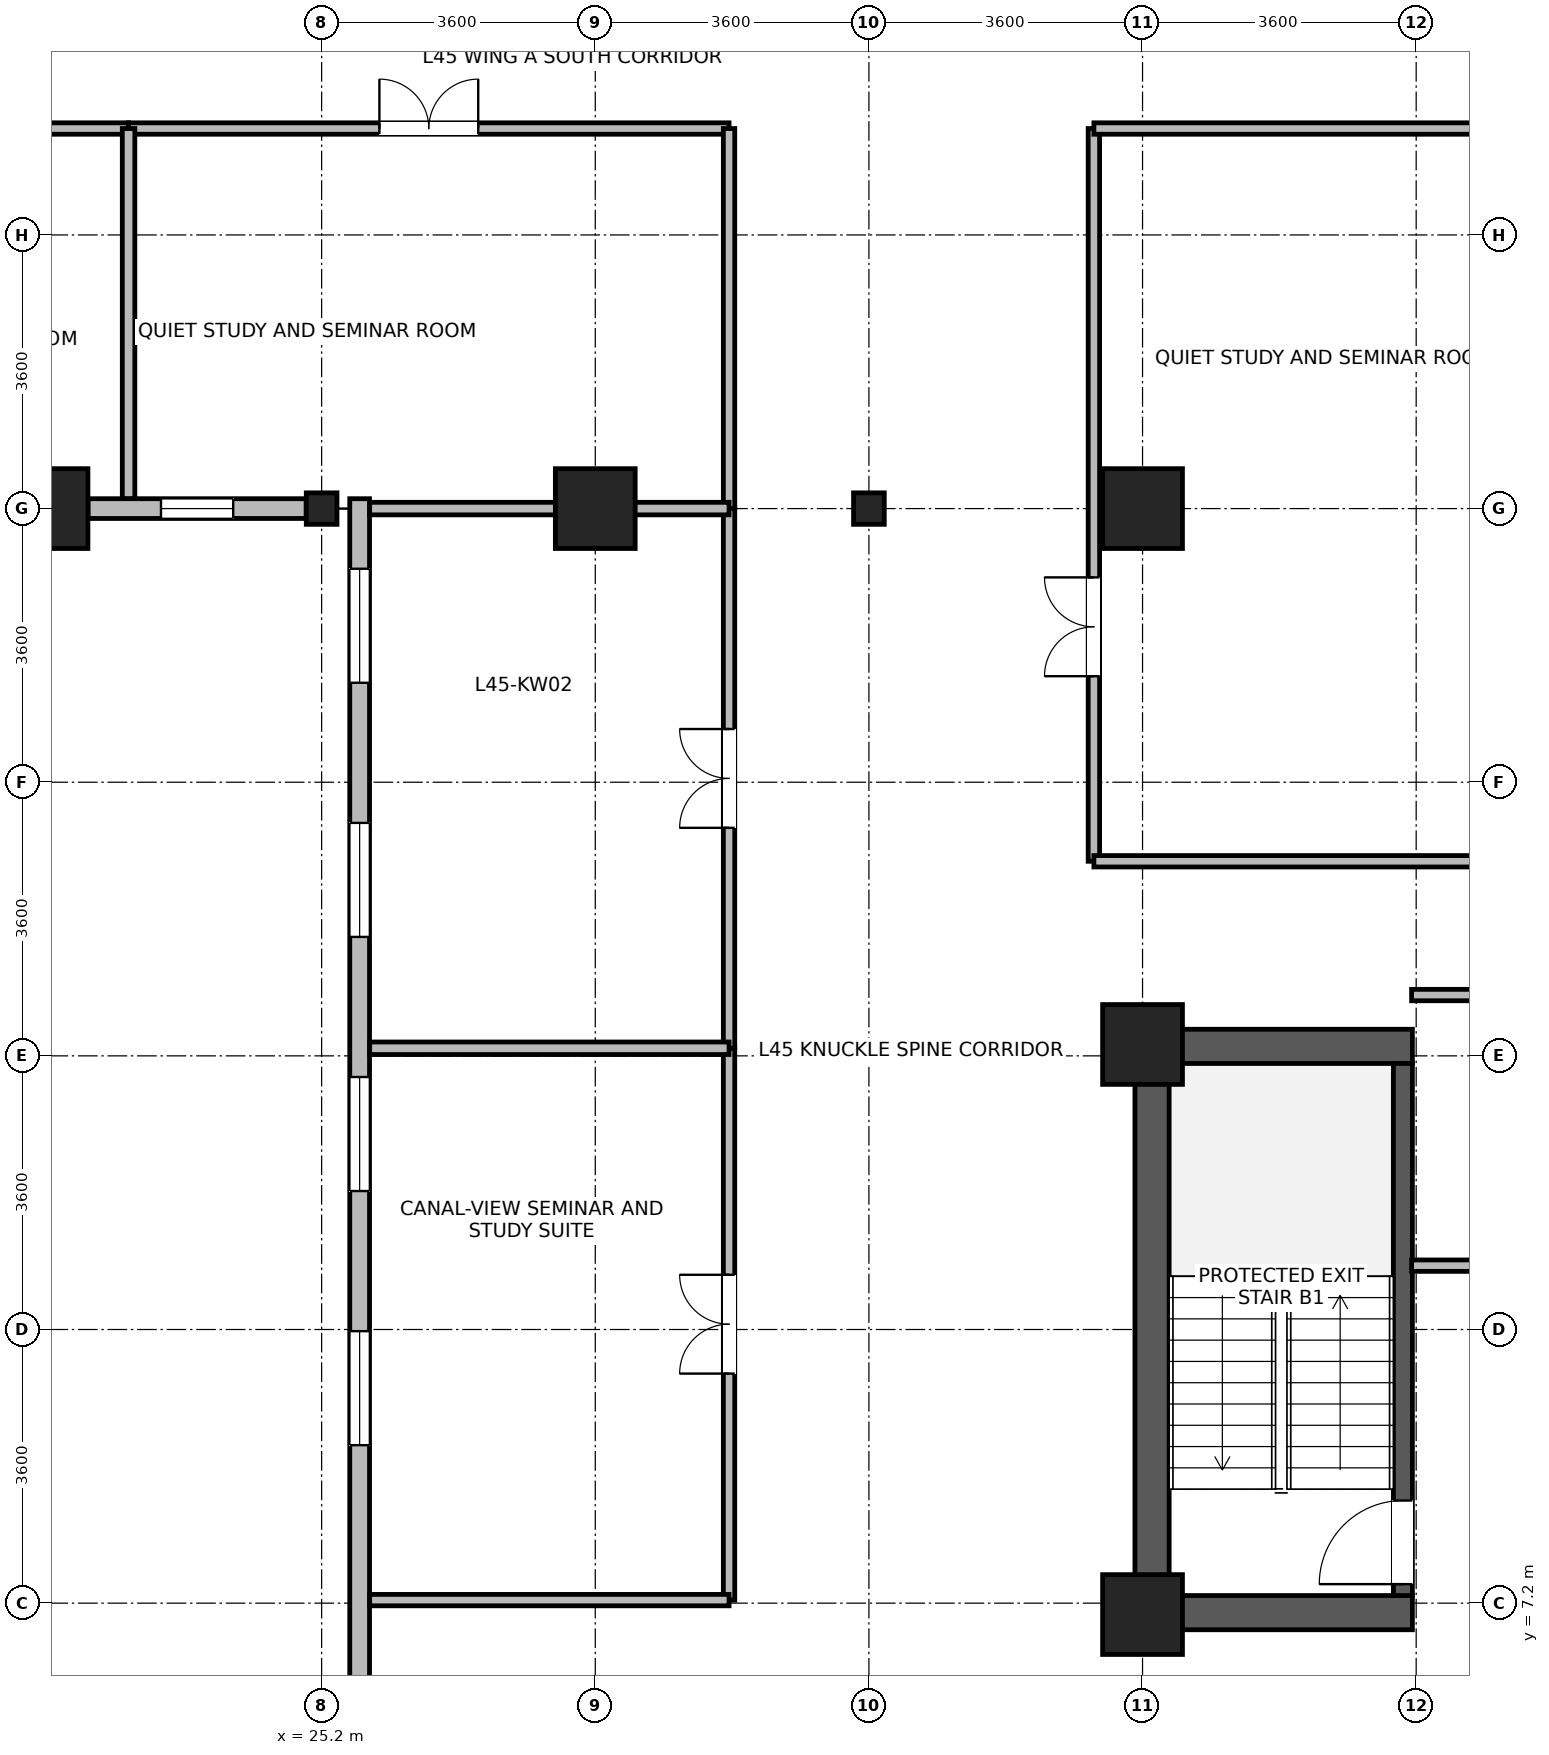
"""IFC4 building model, lengths in metres.
Left out: names, types, materials, properties, quantities, classifications, styles, units other than length and angle.
Written with IfcOpenShell. Run it as: python <this file> out.ifc"""

import sys

from ifc_helpers import new_model, si_unit, direction, frame, frame_2d, origin, origin_2d, place, context, subcontext, project, spatial, rectangle, i_section, extrude, source, transform, mapped, element, fill, save


model = new_model("IFC4")
c1 = context("Model", 3, precision=1e-05, world=origin(), true_north=direction((0.0, 1.0)))
c2 = subcontext(c1, "Body", "Model", "MODEL_VIEW")
j1 = project(units=[si_unit("LENGTHUNIT", "METRE"), si_unit("PLANEANGLEUNIT", "RADIAN")], contexts=[c1])
p1 = place(None, origin())
s1 = spatial("IfcSite", under=j1, at=p1, CompositionType="ELEMENT")
p2 = place(p1, origin())
s2 = spatial("IfcBuilding", under=s1, at=p2, CompositionType="ELEMENT")
p3 = place(p2, frame((0.0, 0.0, 177.2)))
s3 = spatial("IfcBuildingStorey", under=s2, at=p3, CompositionType="ELEMENT", Elevation=177.2)
p4 = place(p3, frame((36.125, 6.85, 0.0), z_axis=(0.0, 0.0, 1.0), x_axis=(0.0, 1.0, 0.0)))
e1 = element("IfcWall", 1, at=p4, inside=s3, PredefinedType="SHEAR", context=c2, shape_type="SweptSolid", body=[
    extrude(rectangle(XDim=7.9, YDim=0.45, at=frame_2d((3.95, 0.0))), origin(), (0.0, 0.0, 1.0), 3.46),
])
for number, where, z_axis, x_axis in (
    (2, (36.35, 7.075, 0.0), (0.0, 0.0, 1.0), (1.0, 0.0, 0.0)),
    (3, (36.35, 14.525, 0.0), (0.0, 0.0, 1.0), (1.0, 0.0, 0.0)),
):
    element("IfcWall", number, at=place(p3, frame(where, z_axis=z_axis, x_axis=x_axis)), inside=s3, PredefinedType="SHEAR", context=c2, shape_type="SweptSolid", body=[
        extrude(rectangle(XDim=3.2, YDim=0.45, at=frame_2d((1.6, 0.0))), origin(), (0.0, 0.0, 1.0), 3.46),
    ])
p5 = place(p3, frame((39.425, 7.3, 0.0), z_axis=(0.0, 0.0, 1.0), x_axis=(0.0, 1.0, 0.0)))
e4 = element("IfcWall", 4, at=p5, inside=s3, PredefinedType="SHEAR", context=c2, shape_type="SweptSolid", body=[
    extrude(rectangle(XDim=7.0, YDim=0.25, at=frame_2d((3.5, 0.0))), origin(), (0.0, 0.0, 1.0), 3.46),
])
p6 = place(p5, frame((0.15, 0.0, 0.0)))
e5 = element("IfcOpeningElement", 5, at=p6, cuts=e4, PredefinedType="OPENING", context=c2, shape_type="SweptSolid", body=[
    extrude(rectangle(XDim=1.1, YDim=2.08, at=frame_2d((0.55, 1.04))), frame((0.0, 0.135, 0.0), z_axis=(0.0, -1.0, 0.0), x_axis=(1.0, 0.0, 0.0)), (0.0, 0.0, 1.0), 0.27),
])
m1 = source(origin(), c2, "Body", "SweptSolid", [
    extrude(rectangle(XDim=1.05, YDim=1.05, at=origin_2d()), origin(), (0.0, 0.0, 1.0), 3.7),
])
for number, where, z_axis, x_axis in (
    (6, (21.6, 21.6, 0.0), (0.0, 0.0, 1.0), (1.0, 0.0, 0.0)),
    (7, (28.8, 21.6, 0.0), (0.0, 0.0, 1.0), (1.0, 0.0, 0.0)),
    (8, (36.0, 21.6, 0.0), (0.0, 0.0, 1.0), (1.0, 0.0, 0.0)),
    (9, (36.0, 7.05, 0.0), (0.0, 0.0, 1.0), (1.0, 0.0, 0.0)),
    (10, (36.0, 14.55, 0.0), (0.0, 0.0, 1.0), (1.0, 0.0, 0.0)),
):
    element("IfcColumn", number, at=place(p3, frame(where, z_axis=z_axis, x_axis=x_axis)), inside=s3, PredefinedType="COLUMN", context=c2, shape_type="MappedRepresentation", body=[
        mapped(m1, transform((0.0, 0.0, 0.0), x_axis=(1.0, 0.0, 0.0), y_axis=(0.0, 1.0, 0.0), z_axis=(0.0, 0.0, 1.0), scale=1.0)),
    ])
m2 = source(origin(), c2, "Body", "SweptSolid", [
    extrude(i_section(OverallWidth=0.404, OverallDepth=0.414, WebThickness=0.021, FlangeThickness=0.028, FilletRadius=0.015, at=origin_2d()), origin(), (0.0, 0.0, 1.0), 3.7),
])
for number, where, z_axis, x_axis in (
    (11, (25.2, 21.6, 0.0), (0.0, 0.0, 1.0), (1.0, 0.0, 0.0)),
    (12, (32.4, 21.6, 0.0), (0.0, 0.0, 1.0), (1.0, 0.0, 0.0)),
):
    element("IfcColumn", number, at=place(p3, frame(where, z_axis=z_axis, x_axis=x_axis)), inside=s3, PredefinedType="COLUMN", context=c2, shape_type="MappedRepresentation", body=[
        mapped(m2, transform((0.0, 0.0, 0.0), x_axis=(1.0, 0.0, 0.0), y_axis=(0.0, 1.0, 0.0), z_axis=(0.0, 0.0, 1.0), scale=1.0)),
    ])
p7 = place(p3, frame((24.997, 21.6, 0.0), z_axis=(0.0, 0.0, 1.0), x_axis=(-1.0, 0.0, 0.0)))
e13 = element("IfcWall", 13, at=p7, inside=s3, PredefinedType="STANDARD", context=c2, shape_type="SweptSolid", body=[
    extrude(rectangle(XDim=2.871, YDim=0.26, at=frame_2d((1.436, 0.0))), origin(), (0.0, 0.0, 1.0), 2.99),
])
p8 = place(p7, frame((0.96, 0.0, 0.85)))
e14 = element("IfcOpeningElement", 14, at=p8, cuts=e13, PredefinedType="OPENING", context=c2, shape_type="SweptSolid", body=[
    extrude(rectangle(XDim=0.95, YDim=1.75, at=frame_2d((0.475, 0.875))), frame((0.0, 0.14, 0.0), z_axis=(0.0, -1.0, 0.0), x_axis=(1.0, 0.0, 0.0)), (0.0, 0.0, 1.0), 0.28),
])
p9 = place(p3, frame((25.7, 1.67, 0.0), z_axis=(0.0, 0.0, 1.0), x_axis=(0.0, 1.0, 0.0)))
e15 = element("IfcWall", 15, at=p9, inside=s3, PredefinedType="STANDARD", context=c2, shape_type="SweptSolid", body=[
    extrude(rectangle(XDim=20.06, YDim=0.26, at=frame_2d((10.03, 0.0))), origin(), (0.0, 0.0, 1.0), 3.44),
])
p10 = place(p9, frame((0.922, 0.0, 0.85)))
e16 = element("IfcOpeningElement", 16, at=p10, cuts=e15, PredefinedType="OPENING", context=c2, shape_type="SweptSolid", body=[
    extrude(rectangle(XDim=1.5, YDim=1.85, at=frame_2d((0.75, 0.925))), frame((0.0, 0.14, 0.0), z_axis=(0.0, -1.0, 0.0), x_axis=(1.0, 0.0, 0.0)), (0.0, 0.0, 1.0), 0.28),
])
p11 = place(p9, frame((7.608, 0.0, 0.85)))
e17 = element("IfcOpeningElement", 17, at=p11, cuts=e15, PredefinedType="OPENING", context=c2, shape_type="SweptSolid", body=[
    extrude(rectangle(XDim=1.5, YDim=1.85, at=frame_2d((0.75, 0.925))), frame((0.0, 0.14, 0.0), z_axis=(0.0, -1.0, 0.0), x_axis=(1.0, 0.0, 0.0)), (0.0, 0.0, 1.0), 0.28),
])
p12 = place(p9, frame((10.952, 0.0, 0.85)))
e18 = element("IfcOpeningElement", 18, at=p12, cuts=e15, PredefinedType="OPENING", context=c2, shape_type="SweptSolid", body=[
    extrude(rectangle(XDim=1.5, YDim=1.85, at=frame_2d((0.75, 0.925))), frame((0.0, 0.14, 0.0), z_axis=(0.0, -1.0, 0.0), x_axis=(1.0, 0.0, 0.0)), (0.0, 0.0, 1.0), 0.28),
])
p13 = place(p9, frame((14.295, 0.0, 0.85)))
e19 = element("IfcOpeningElement", 19, at=p13, cuts=e15, PredefinedType="OPENING", context=c2, shape_type="SweptSolid", body=[
    extrude(rectangle(XDim=1.5, YDim=1.85, at=frame_2d((0.75, 0.925))), frame((0.0, 0.14, 0.0), z_axis=(0.0, -1.0, 0.0), x_axis=(1.0, 0.0, 0.0)), (0.0, 0.0, 1.0), 0.28),
])
p14 = place(p9, frame((17.638, 0.0, 0.85)))
e20 = element("IfcOpeningElement", 20, at=p14, cuts=e15, PredefinedType="OPENING", context=c2, shape_type="SweptSolid", body=[
    extrude(rectangle(XDim=1.5, YDim=1.85, at=frame_2d((0.75, 0.925))), frame((0.0, 0.14, 0.0), z_axis=(0.0, -1.0, 0.0), x_axis=(1.0, 0.0, 0.0)), (0.0, 0.0, 1.0), 0.28),
])
p15 = place(p3, frame((35.36, 16.96, 0.0), z_axis=(0.0, 0.0, 1.0), x_axis=(0.0, 1.0, 0.0)))
e21 = element("IfcWall", 21, at=p15, inside=s3, PredefinedType="PARTITIONING", context=c2, shape_type="SweptSolid", body=[
    extrude(rectangle(XDim=9.64, YDim=0.15, at=frame_2d((4.82, 0.0))), origin(), (0.0, 0.0, 1.0), 3.44),
])
p16 = place(p15, frame((2.435, 0.0, 0.0)))
e22 = element("IfcOpeningElement", 22, at=p16, cuts=e21, PredefinedType="OPENING", context=c2, shape_type="SweptSolid", body=[
    extrude(rectangle(XDim=1.3, YDim=2.12, at=frame_2d((0.65, 1.06))), frame((0.0, 0.085, 0.0), z_axis=(0.0, -1.0, 0.0), x_axis=(1.0, 0.0, 0.0)), (0.0, 0.0, 1.0), 0.17),
])
p17 = place(p3, frame((22.66, 26.6, 0.0), z_axis=(0.0, 0.0, 1.0), x_axis=(1.0, 0.0, 0.0)))
e23 = element("IfcWall", 23, at=p17, inside=s3, PredefinedType="PARTITIONING", context=c2, shape_type="SweptSolid", body=[
    extrude(rectangle(XDim=7.9, YDim=0.15, at=frame_2d((3.95, 0.0))), origin(), (0.0, 0.0, 1.0), 3.44),
])
p18 = place(p17, frame((3.3, 0.0, 0.0)))
e24 = element("IfcOpeningElement", 24, at=p18, cuts=e23, PredefinedType="OPENING", context=c2, shape_type="SweptSolid", body=[
    extrude(rectangle(XDim=1.3, YDim=2.12, at=frame_2d((0.65, 1.06))), frame((0.0, 0.085, 0.0), z_axis=(0.0, -1.0, 0.0), x_axis=(1.0, 0.0, 0.0)), (0.0, 0.0, 1.0), 0.17),
])
p19 = place(p3, frame((30.56, 7.24, 0.0), z_axis=(0.0, 0.0, 1.0), x_axis=(0.0, 1.0, 0.0)))
e25 = element("IfcWall", 25, at=p19, inside=s3, PredefinedType="PARTITIONING", context=c2, shape_type="SweptSolid", body=[
    extrude(rectangle(XDim=7.26, YDim=0.15, at=frame_2d((3.63, 0.0))), origin(), (0.0, 0.0, 1.0), 3.44),
])
p20 = place(p19, frame((2.98, 0.0, 0.0)))
e26 = element("IfcOpeningElement", 26, at=p20, cuts=e25, PredefinedType="OPENING", context=c2, shape_type="SweptSolid", body=[
    extrude(rectangle(XDim=1.3, YDim=2.12, at=frame_2d((0.65, 1.06))), frame((0.0, 0.085, 0.0), z_axis=(0.0, -1.0, 0.0), x_axis=(1.0, 0.0, 0.0)), (0.0, 0.0, 1.0), 0.17),
])
p21 = place(p3, frame((30.56, 14.5, 0.0), z_axis=(0.0, 0.0, 1.0), x_axis=(0.0, 1.0, 0.0)))
e27 = element("IfcWall", 27, at=p21, inside=s3, PredefinedType="PARTITIONING", context=c2, shape_type="SweptSolid", body=[
    extrude(rectangle(XDim=7.1, YDim=0.15, at=frame_2d((3.55, 0.0))), origin(), (0.0, 0.0, 1.0), 3.44),
])
p22 = place(p21, frame((2.9, 0.0, 0.0)))
e28 = element("IfcOpeningElement", 28, at=p22, cuts=e27, PredefinedType="OPENING", context=c2, shape_type="SweptSolid", body=[
    extrude(rectangle(XDim=1.3, YDim=2.12, at=frame_2d((0.65, 1.06))), frame((0.0, 0.085, 0.0), z_axis=(0.0, -1.0, 0.0), x_axis=(1.0, 0.0, 0.0)), (0.0, 0.0, 1.0), 0.17),
])
for number, where, z_axis, x_axis in (
    (29, (35.36, 16.96, 0.0), (0.0, 0.0, 1.0), (1.0, 0.0, 0.0)),
    (30, (35.36, 26.6, 0.0), (0.0, 0.0, 1.0), (1.0, 0.0, 0.0)),
):
    element("IfcWall", number, at=place(p3, frame(where, z_axis=z_axis, x_axis=x_axis)), inside=s3, PredefinedType="PARTITIONING", context=c2, shape_type="SweptSolid", body=[
        extrude(rectangle(XDim=6.06, YDim=0.15, at=frame_2d((3.03, 0.0))), origin(), (0.0, 0.0, 1.0), 3.44),
    ])
p23 = place(p3, frame((16.86, 26.6, 0.0), z_axis=(0.0, 0.0, 1.0), x_axis=(1.0, 0.0, 0.0)))
e31 = element("IfcWall", 31, at=p23, inside=s3, PredefinedType="PARTITIONING", context=c2, shape_type="SweptSolid", body=[
    extrude(rectangle(XDim=5.8, YDim=0.15, at=frame_2d((2.9, 0.0))), origin(), (0.0, 0.0, 1.0), 3.44),
])
p24 = place(p23, frame((2.25, 0.0, 0.0)))
e32 = element("IfcOpeningElement", 32, at=p24, cuts=e31, PredefinedType="OPENING", context=c2, shape_type="SweptSolid", body=[
    extrude(rectangle(XDim=1.3, YDim=2.12, at=frame_2d((0.65, 1.06))), frame((0.0, 0.085, 0.0), z_axis=(0.0, -1.0, 0.0), x_axis=(1.0, 0.0, 0.0)), (0.0, 0.0, 1.0), 0.17),
])
p25 = place(p3, frame((39.54, 11.64, 0.0), z_axis=(0.0, 0.0, 1.0), x_axis=(1.0, 0.0, 0.0)))
e33 = element("IfcWall", 33, at=p25, inside=s3, PredefinedType="PARTITIONING", context=c2, shape_type="SweptSolid", body=[
    extrude(rectangle(XDim=5.47, YDim=0.15, at=frame_2d((2.735, 0.0))), origin(), (0.0, 0.0, 1.0), 3.44),
])
p26 = place(p25, frame((2.31, 0.0, 0.0)))
e34 = element("IfcOpeningElement", 34, at=p26, cuts=e33, PredefinedType="OPENING", context=c2, shape_type="SweptSolid", body=[
    extrude(rectangle(XDim=0.85, YDim=2.04, at=frame_2d((0.425, 1.02))), frame((0.0, 0.085, 0.0), z_axis=(0.0, -1.0, 0.0), x_axis=(1.0, 0.0, 0.0)), (0.0, 0.0, 1.0), 0.17),
])
p27 = place(p3, frame((39.54, 15.2, 0.0), z_axis=(0.0, 0.0, 1.0), x_axis=(1.0, 0.0, 0.0)))
e35 = element("IfcWall", 35, at=p27, inside=s3, PredefinedType="PARTITIONING", context=c2, shape_type="SweptSolid", body=[
    extrude(rectangle(XDim=5.5, YDim=0.15, at=frame_2d((2.75, 0.0))), origin(), (0.0, 0.0, 1.0), 3.44),
])
p28 = place(p3, frame((30.56, 21.6, 0.0), z_axis=(0.0, 0.0, 1.0), x_axis=(0.0, 1.0, 0.0)))
e36 = element("IfcWall", 36, at=p28, inside=s3, PredefinedType="PARTITIONING", context=c2, shape_type="SweptSolid", body=[
    extrude(rectangle(XDim=5.0, YDim=0.15, at=frame_2d((2.5, 0.0))), origin(), (0.0, 0.0, 1.0), 3.44),
])
p29 = place(p3, frame((25.832, 7.24, 0.0), z_axis=(0.0, 0.0, 1.0), x_axis=(1.0, 0.0, 0.0)))
e37 = element("IfcWall", 37, at=p29, inside=s3, PredefinedType="PARTITIONING", context=c2, shape_type="SweptSolid", body=[
    extrude(rectangle(XDim=4.728, YDim=0.15, at=frame_2d((2.364, 0.0))), origin(), (0.0, 0.0, 1.0), 3.44),
])
p30 = place(p3, frame((22.66, 21.732, 0.0), z_axis=(0.0, 0.0, 1.0), x_axis=(0.0, 1.0, 0.0)))
e38 = element("IfcWall", 38, at=p30, inside=s3, PredefinedType="PARTITIONING", context=c2, shape_type="SweptSolid", body=[
    extrude(rectangle(XDim=4.868, YDim=0.165, at=frame_2d((2.434, 0.0))), origin(), (0.0, 0.0, 1.0), 3.44),
])
p31 = place(p3, frame((25.832, 14.5, 0.0), z_axis=(0.0, 0.0, 1.0), x_axis=(1.0, 0.0, 0.0)))
e39 = element("IfcWall", 39, at=p31, inside=s3, PredefinedType="PARTITIONING", context=c2, shape_type="SweptSolid", body=[
    extrude(rectangle(XDim=4.728, YDim=0.165, at=frame_2d((2.364, 0.0))), origin(), (0.0, 0.0, 1.0), 3.44),
])
p32 = place(p3, frame((25.832, 21.6, 0.0), z_axis=(0.0, 0.0, 1.0), x_axis=(1.0, 0.0, 0.0)))
e40 = element("IfcWall", 40, at=p32, inside=s3, PredefinedType="PARTITIONING", context=c2, shape_type="SweptSolid", body=[
    extrude(rectangle(XDim=4.728, YDim=0.165, at=frame_2d((2.364, 0.0))), origin(), (0.0, 0.0, 1.0), 2.99),
])
p33 = place(p8, origin())
e41 = element("IfcWindow", 41, at=p33, inside=s3, PartitioningType="SINGLE_PANEL", PredefinedType="WINDOW", context=c2, shape_type="SweptSolid", body=[
    extrude(rectangle(XDim=0.95, YDim=1.75, at=frame_2d((0.475, 0.875))), frame((0.0, 0.03, 0.0), z_axis=(0.0, -1.0, 0.0), x_axis=(1.0, 0.0, 0.0)), (0.0, 0.0, 1.0), 0.06),
])
fill(e14, e41)
p34 = place(p11, origin())
e42 = element("IfcWindow", 42, at=p34, inside=s3, PartitioningType="SINGLE_PANEL", PredefinedType="WINDOW", context=c2, shape_type="SweptSolid", body=[
    extrude(rectangle(XDim=1.5, YDim=1.85, at=frame_2d((0.75, 0.925))), frame((0.0, 0.03, 0.0), z_axis=(0.0, -1.0, 0.0), x_axis=(1.0, 0.0, 0.0)), (0.0, 0.0, 1.0), 0.06),
])
fill(e17, e42)
p35 = place(p12, origin())
e43 = element("IfcWindow", 43, at=p35, inside=s3, PartitioningType="SINGLE_PANEL", PredefinedType="WINDOW", context=c2, shape_type="SweptSolid", body=[
    extrude(rectangle(XDim=1.5, YDim=1.85, at=frame_2d((0.75, 0.925))), frame((0.0, 0.03, 0.0), z_axis=(0.0, -1.0, 0.0), x_axis=(1.0, 0.0, 0.0)), (0.0, 0.0, 1.0), 0.06),
])
fill(e18, e43)
p36 = place(p13, origin())
e44 = element("IfcWindow", 44, at=p36, inside=s3, PartitioningType="SINGLE_PANEL", PredefinedType="WINDOW", context=c2, shape_type="SweptSolid", body=[
    extrude(rectangle(XDim=1.5, YDim=1.85, at=frame_2d((0.75, 0.925))), frame((0.0, 0.03, 0.0), z_axis=(0.0, -1.0, 0.0), x_axis=(1.0, 0.0, 0.0)), (0.0, 0.0, 1.0), 0.06),
])
fill(e19, e44)
p37 = place(p14, origin())
e45 = element("IfcWindow", 45, at=p37, inside=s3, PartitioningType="SINGLE_PANEL", PredefinedType="WINDOW", context=c2, shape_type="SweptSolid", body=[
    extrude(rectangle(XDim=1.5, YDim=1.85, at=frame_2d((0.75, 0.925))), frame((0.0, 0.03, 0.0), z_axis=(0.0, -1.0, 0.0), x_axis=(1.0, 0.0, 0.0)), (0.0, 0.0, 1.0), 0.06),
])
fill(e20, e45)
p38 = place(p6, origin())
e46 = element("IfcDoor", 46, at=p38, inside=s3, OperationType="SINGLE_SWING_LEFT", PredefinedType="DOOR", context=c2, shape_type="SweptSolid", body=[
    extrude(rectangle(XDim=1.1, YDim=2.08, at=frame_2d((0.55, 1.04))), frame((0.0, 0.025, 0.0), z_axis=(0.0, -1.0, 0.0), x_axis=(1.0, 0.0, 0.0)), (0.0, 0.0, 1.0), 0.05),
])
fill(e5, e46)
p39 = place(p16, origin())
e47 = element("IfcDoor", 47, at=p39, inside=s3, OperationType="DOUBLE_DOOR_SINGLE_SWING", PredefinedType="DOOR", context=c2, shape_type="SweptSolid", body=[
    extrude(rectangle(XDim=1.3, YDim=2.12, at=frame_2d((0.65, 1.06))), frame((0.0, 0.025, 0.0), z_axis=(0.0, -1.0, 0.0), x_axis=(1.0, 0.0, 0.0)), (0.0, 0.0, 1.0), 0.05),
])
fill(e22, e47)
p40 = place(p18, origin())
e48 = element("IfcDoor", 48, at=p40, inside=s3, OperationType="DOUBLE_DOOR_SINGLE_SWING", PredefinedType="DOOR", context=c2, shape_type="SweptSolid", body=[
    extrude(rectangle(XDim=1.3, YDim=2.12, at=frame_2d((0.65, 1.06))), frame((0.0, 0.025, 0.0), z_axis=(0.0, -1.0, 0.0), x_axis=(1.0, 0.0, 0.0)), (0.0, 0.0, 1.0), 0.05),
])
fill(e24, e48)
p41 = place(p20, origin())
e49 = element("IfcDoor", 49, at=p41, inside=s3, OperationType="DOUBLE_DOOR_SINGLE_SWING", PredefinedType="DOOR", context=c2, shape_type="SweptSolid", body=[
    extrude(rectangle(XDim=1.3, YDim=2.12, at=frame_2d((0.65, 1.06))), frame((0.0, 0.025, 0.0), z_axis=(0.0, -1.0, 0.0), x_axis=(1.0, 0.0, 0.0)), (0.0, 0.0, 1.0), 0.05),
])
fill(e26, e49)
p42 = place(p22, origin())
e50 = element("IfcDoor", 50, at=p42, inside=s3, OperationType="DOUBLE_DOOR_SINGLE_SWING", PredefinedType="DOOR", context=c2, shape_type="SweptSolid", body=[
    extrude(rectangle(XDim=1.3, YDim=2.12, at=frame_2d((0.65, 1.06))), frame((0.0, 0.025, 0.0), z_axis=(0.0, -1.0, 0.0), x_axis=(1.0, 0.0, 0.0)), (0.0, 0.0, 1.0), 0.05),
])
fill(e28, e50)
save(model, sys.argv[1])
